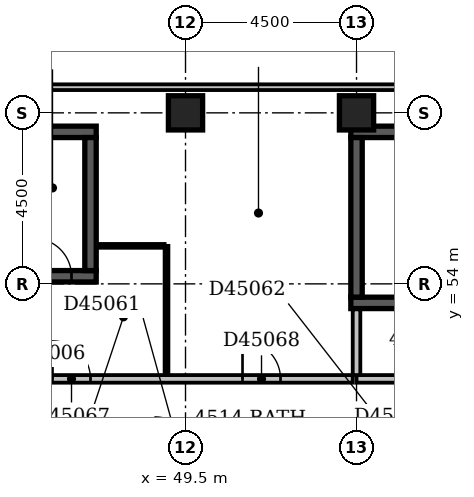
"""IFC4 building model, lengths in metres.
Left out: names, types, materials, properties, quantities, classifications, styles, units other than length and angle.
Written with IfcOpenShell. Run it as: python <this file> out.ifc"""

import sys

from ifc_helpers import new_model, si_unit, direction, frame, frame_2d, origin, origin_2d, place, context, subcontext, project, spatial, rectangle, extrude, element, fill, save


model = new_model("IFC4")
c1 = context("Model", 3, precision=1e-05, world=origin(), true_north=direction((0.0, 1.0)))
c2 = subcontext(c1, "Body", "Model", "MODEL_VIEW")
j1 = project(units=[si_unit("LENGTHUNIT", "METRE"), si_unit("PLANEANGLEUNIT", "RADIAN")], contexts=[c1])
p1 = place(None, origin())
s1 = spatial("IfcSite", under=j1, at=p1, CompositionType="ELEMENT")
p2 = place(p1, origin())
s2 = spatial("IfcBuilding", under=s1, at=p2, CompositionType="ELEMENT")
p3 = place(p2, frame((0.0, 0.0, 179.0)))
s3 = spatial("IfcBuildingStorey", under=s2, at=p3, CompositionType="ELEMENT", Elevation=179.0)
p4 = place(p3, frame((44.85, 54.2, -0.3), z_axis=(0.0, 0.0, 1.0), x_axis=(1.0, 0.0, 0.0)))
e1 = element("IfcWall", 1, at=p4, inside=s3, PredefinedType="SHEAR", context=c2, shape_type="SweptSolid", body=[
    extrude(rectangle(XDim=2.3, YDim=0.3, at=frame_2d((1.15, 0.0))), origin(), (0.0, 0.0, 1.0), 3.6),
])
p5 = place(p4, frame((0.65, 0.0, 0.3)))
e2 = element("IfcOpeningElement", 2, at=p5, cuts=e1, PredefinedType="OPENING", context=c2, shape_type="SweptSolid", body=[
    extrude(rectangle(XDim=1.0, YDim=2.1, at=frame_2d((0.5, 1.05))), frame((0.0, 0.162, 0.0), z_axis=(0.0, -1.0, 0.0), x_axis=(1.0, 0.0, 0.0)), (0.0, 0.0, 1.0), 0.324),
])
p6 = place(p3, frame((44.85, 58.0, -0.3), z_axis=(0.0, 0.0, 1.0), x_axis=(1.0, 0.0, 0.0)))
e3 = element("IfcWall", 3, at=p6, inside=s3, PredefinedType="SHEAR", context=c2, shape_type="SweptSolid", body=[
    extrude(rectangle(XDim=2.3, YDim=0.3, at=frame_2d((1.15, 0.0))), origin(), (0.0, 0.0, 1.0), 3.6),
])
p7 = place(p3, frame((47.0, 54.35, -0.3), z_axis=(0.0, 0.0, 1.0), x_axis=(0.0, 1.0, 0.0)))
e4 = element("IfcWall", 4, at=p7, inside=s3, PredefinedType="SHEAR", context=c2, shape_type="SweptSolid", body=[
    extrude(rectangle(XDim=3.5, YDim=0.3, at=frame_2d((1.75, 0.0))), origin(), (0.0, 0.0, 1.0), 3.6),
])
p8 = place(p3, frame((53.85, 53.5, -0.3), z_axis=(0.0, 0.0, 1.0), x_axis=(1.0, 0.0, 0.0)))
e5 = element("IfcWall", 5, at=p8, inside=s3, PredefinedType="SHEAR", context=c2, shape_type="SweptSolid", body=[
    extrude(rectangle(XDim=7.0, YDim=0.3, at=frame_2d((3.5, 0.0))), origin(), (0.0, 0.0, 1.0), 3.6),
])
p9 = place(p8, frame((5.58, 0.0, 0.3)))
e6 = element("IfcOpeningElement", 6, at=p9, cuts=e5, PredefinedType="OPENING", context=c2, shape_type="SweptSolid", body=[
    extrude(rectangle(XDim=1.1, YDim=2.1, at=frame_2d((0.55, 1.05))), frame((0.0, 0.162, 0.0), z_axis=(0.0, -1.0, 0.0), x_axis=(1.0, 0.0, 0.0)), (0.0, 0.0, 1.0), 0.324),
])
p10 = place(p3, frame((53.85, 58.0, -0.3), z_axis=(0.0, 0.0, 1.0), x_axis=(1.0, 0.0, 0.0)))
e7 = element("IfcWall", 7, at=p10, inside=s3, PredefinedType="SHEAR", context=c2, shape_type="SweptSolid", body=[
    extrude(rectangle(XDim=7.0, YDim=0.3, at=frame_2d((3.5, 0.0))), origin(), (0.0, 0.0, 1.0), 3.6),
])
p11 = place(p3, frame((54.0, 53.65, -0.3), z_axis=(0.0, 0.0, 1.0), x_axis=(0.0, 1.0, 0.0)))
e8 = element("IfcWall", 8, at=p11, inside=s3, PredefinedType="SHEAR", context=c2, shape_type="SweptSolid", body=[
    extrude(rectangle(XDim=4.2, YDim=0.3, at=frame_2d((2.1, 0.0))), origin(), (0.0, 0.0, 1.0), 3.6),
])
for number, where, z_axis, x_axis in (
    (9, (49.5, 58.5, -0.3), (0.0, 0.0, 1.0), (1.0, 0.0, 0.0)),
    (10, (54.0, 58.5, -0.3), (0.0, 0.0, 1.0), (1.0, 0.0, 0.0)),
):
    element("IfcColumn", number, at=place(p3, frame(where, z_axis=z_axis, x_axis=x_axis)), inside=s3, PredefinedType="COLUMN", context=c2, shape_type="SweptSolid", body=[
        extrude(rectangle(XDim=0.9, YDim=0.9, at=origin_2d()), origin(), (0.0, 0.0, 1.0), 3.6),
    ])
p12 = place(p3, frame((68.1, 59.175, 0.0), z_axis=(0.0, 0.0, 1.0), x_axis=(-1.0, 0.0, 0.0)))
e11 = element("IfcWall", 11, at=p12, inside=s3, PredefinedType="STANDARD", context=c2, shape_type="SweptSolid", body=[
    extrude(rectangle(XDim=68.85, YDim=0.15, at=frame_2d((34.425, 0.0))), origin(), (0.0, 0.0, 1.0), 2.7),
])
p13 = place(p3, frame((54.0, 51.5, 0.0), z_axis=(0.0, 0.0, 1.0), x_axis=(1.0, 0.0, 0.0)))
e12 = element("IfcWall", 12, at=p13, inside=s3, PredefinedType="PARTITIONING", context=c2, shape_type="SweptSolid", body=[
    extrude(rectangle(XDim=6.7, YDim=0.2, at=frame_2d((3.35, 0.0))), origin(), (0.0, 0.0, 1.0), 3.3),
])
p14 = place(p13, frame((2.75, 0.0, 0.0)))
e13 = element("IfcOpeningElement", 13, at=p14, cuts=e12, PredefinedType="OPENING", context=c2, shape_type="SweptSolid", body=[
    extrude(rectangle(XDim=1.2, YDim=2.1, at=frame_2d((0.6, 1.05))), frame((0.0, 0.112, 0.0), z_axis=(0.0, -1.0, 0.0), x_axis=(1.0, 0.0, 0.0)), (0.0, 0.0, 1.0), 0.224),
])
p15 = place(p3, frame((54.0, 51.6, 0.0), z_axis=(0.0, 0.0, 1.0), x_axis=(0.0, 1.0, 0.0)))
e14 = element("IfcWall", 14, at=p15, inside=s3, PredefinedType="PARTITIONING", context=c2, shape_type="SweptSolid", body=[
    extrude(rectangle(XDim=1.73, YDim=0.2, at=frame_2d((0.865, 0.0))), origin(), (0.0, 0.0, 1.0), 2.6),
])
p16 = place(p3, frame((44.1, 51.5, 0.0), z_axis=(0.0, 0.0, 1.0), x_axis=(1.0, 0.0, 0.0)))
e15 = element("IfcWall", 15, at=p16, inside=s3, PredefinedType="PARTITIONING", context=c2, shape_type="SweptSolid", body=[
    extrude(rectangle(XDim=9.8, YDim=0.2, at=frame_2d((4.9, 0.0))), origin(), (0.0, 0.0, 1.0), 3.3),
])
p17 = place(p16, frame((1.9, 0.0, 0.0)))
e16 = element("IfcOpeningElement", 16, at=p17, cuts=e15, PredefinedType="OPENING", context=c2, shape_type="SweptSolid", body=[
    extrude(rectangle(XDim=1.0, YDim=2.1, at=frame_2d((0.5, 1.05))), frame((0.0, 0.112, 0.0), z_axis=(0.0, -1.0, 0.0), x_axis=(1.0, 0.0, 0.0)), (0.0, 0.0, 1.0), 0.224),
])
p18 = place(p16, frame((6.9, 0.0, 0.0)))
e17 = element("IfcOpeningElement", 17, at=p18, cuts=e15, PredefinedType="OPENING", context=c2, shape_type="SweptSolid", body=[
    extrude(rectangle(XDim=1.0, YDim=2.1, at=frame_2d((0.5, 1.05))), frame((0.0, 0.112, 0.0), z_axis=(0.0, -1.0, 0.0), x_axis=(1.0, 0.0, 0.0)), (0.0, 0.0, 1.0), 0.224),
])
p19 = place(p3, frame((49.0, 51.6, 0.0), z_axis=(0.0, 0.0, 1.0), x_axis=(0.0, 1.0, 0.0)))
e18 = element("IfcWall", 18, at=p19, inside=s3, PredefinedType="PARTITIONING", context=c2, shape_type="SweptSolid", body=[
    extrude(rectangle(XDim=3.4, YDim=0.1, at=frame_2d((1.7, 0.0))), origin(), (0.0, 0.0, 1.0), 3.3),
])
p20 = place(p3, frame((47.15, 55.0, 0.0), z_axis=(0.0, 0.0, 1.0), x_axis=(1.0, 0.0, 0.0)))
e19 = element("IfcWall", 19, at=p20, inside=s3, PredefinedType="PARTITIONING", context=c2, shape_type="SweptSolid", body=[
    extrude(rectangle(XDim=1.8, YDim=0.1, at=frame_2d((0.9, 0.0))), origin(), (0.0, 0.0, 1.0), 3.3),
])
p21 = place(p5, origin())
e20 = element("IfcDoor", 20, at=p21, inside=s3, OperationType="SINGLE_SWING_LEFT", PredefinedType="DOOR", context=c2, shape_type="SweptSolid", body=[
    extrude(rectangle(XDim=1.0, YDim=2.1, at=frame_2d((0.5, 1.05))), frame((0.0, 0.025, 0.0), z_axis=(0.0, -1.0, 0.0), x_axis=(1.0, 0.0, 0.0)), (0.0, 0.0, 1.0), 0.05),
])
fill(e2, e20)
p22 = place(p17, origin())
e21 = element("IfcDoor", 21, at=p22, inside=s3, OperationType="SINGLE_SWING_LEFT", PredefinedType="DOOR", context=c2, shape_type="SweptSolid", body=[
    extrude(rectangle(XDim=1.0, YDim=2.1, at=frame_2d((0.5, 1.05))), frame((0.0, 0.025, 0.0), z_axis=(0.0, -1.0, 0.0), x_axis=(1.0, 0.0, 0.0)), (0.0, 0.0, 1.0), 0.05),
])
fill(e16, e21)
p23 = place(p18, origin())
e22 = element("IfcDoor", 22, at=p23, inside=s3, OperationType="SINGLE_SWING_LEFT", PredefinedType="DOOR", context=c2, shape_type="SweptSolid", body=[
    extrude(rectangle(XDim=1.0, YDim=2.1, at=frame_2d((0.5, 1.05))), frame((0.0, 0.025, 0.0), z_axis=(0.0, -1.0, 0.0), x_axis=(1.0, 0.0, 0.0)), (0.0, 0.0, 1.0), 0.05),
])
fill(e17, e22)
save(model, sys.argv[1])
